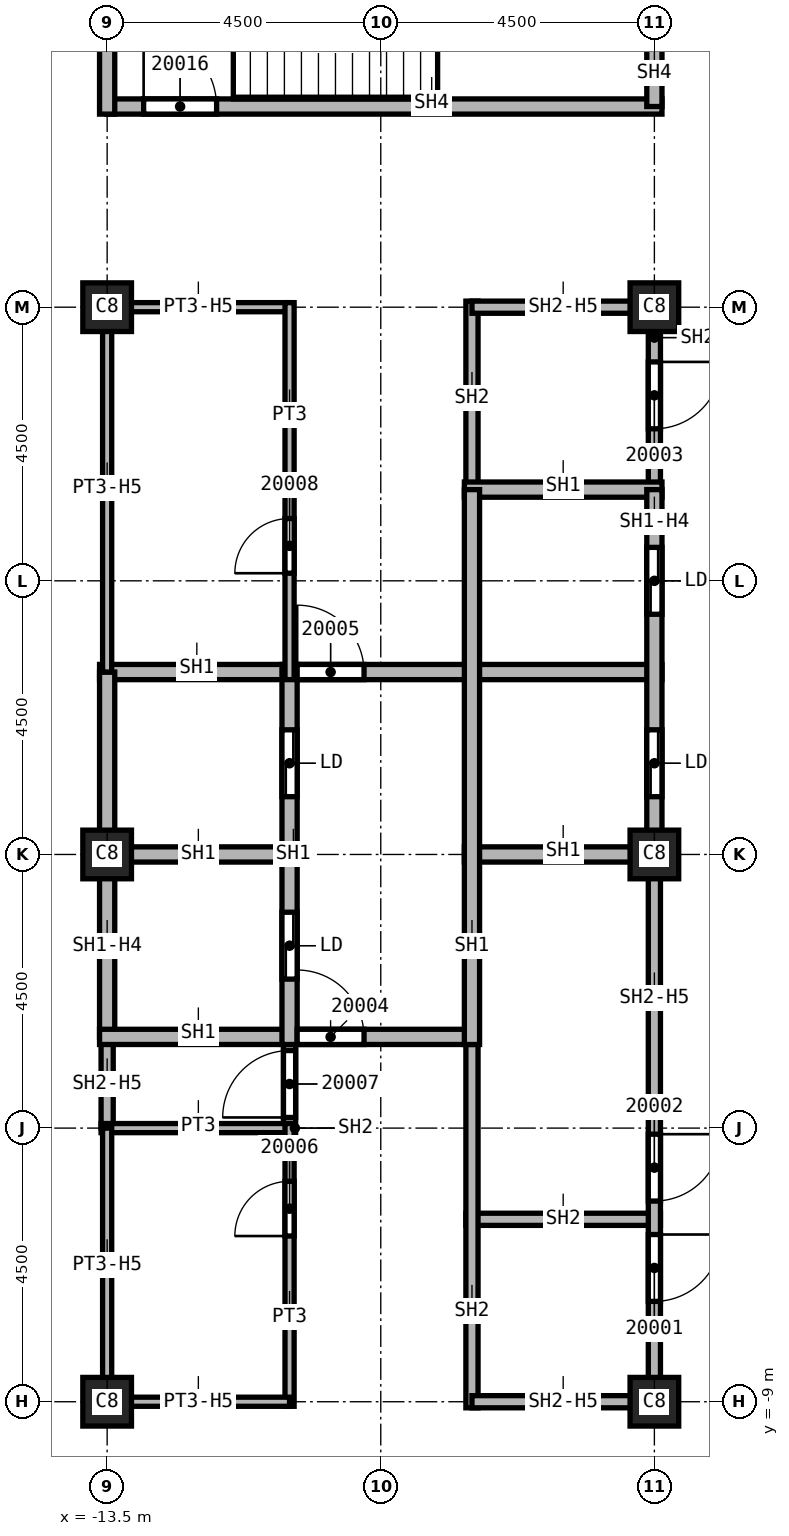
"""IFC4 building model, lengths in metres.
Left out: names, types, materials, properties, quantities, classifications, styles, units other than length and angle.
Written with IfcOpenShell. Run it as: python <this file> out.ifc"""

import sys

from ifc_helpers import new_model, si_unit, direction, frame, frame_2d, origin, origin_2d, place, context, subcontext, project, spatial, rectangle, extrude, element, fill, save


model = new_model("IFC4")
c1 = context("Model", 3, precision=1e-05, world=origin(), true_north=direction((0.0, 1.0)))
c2 = subcontext(c1, "Body", "Model", "MODEL_VIEW")
j1 = project(units=[si_unit("LENGTHUNIT", "METRE"), si_unit("PLANEANGLEUNIT", "RADIAN")], contexts=[c1])
p1 = place(None, origin())
s1 = spatial("IfcSite", under=j1, at=p1, CompositionType="ELEMENT")
p2 = place(p1, origin())
s2 = spatial("IfcBuilding", under=s1, at=p2, CompositionType="ELEMENT")
p3 = place(p2, frame((0.0, 0.0, 290.0)))
s3 = spatial("IfcBuildingStorey", under=s2, at=p3, CompositionType="ELEMENT", Elevation=290.0)
for number, where, z_axis, x_axis in (
    (1, (-4.5, 0.0, 0.0), (0.0, 0.0, 1.0), (1.0, 0.0, 0.0)),
    (2, (-4.5, 9.0, 0.0), (0.0, 0.0, 1.0), (1.0, 0.0, 0.0)),
    (3, (-4.5, -9.0, 0.0), (0.0, 0.0, 1.0), (1.0, 0.0, 0.0)),
    (4, (-13.5, 0.0, 0.0), (0.0, 0.0, 1.0), (1.0, 0.0, 0.0)),
    (5, (-13.5, 9.0, 0.0), (0.0, 0.0, 1.0), (1.0, 0.0, 0.0)),
    (6, (-13.5, -9.0, 0.0), (0.0, 0.0, 1.0), (1.0, 0.0, 0.0)),
):
    element("IfcColumn", number, at=place(p3, frame(where, z_axis=z_axis, x_axis=x_axis)), inside=s3, PredefinedType="COLUMN", context=c2, shape_type="SweptSolid", body=[
        extrude(rectangle(XDim=0.8, YDim=0.8, at=origin_2d()), origin(), (0.0, 0.0, 1.0), 3.59),
    ])
p4 = place(p3, frame((-13.5, -4.5, 0.0), z_axis=(0.0, 0.0, 1.0), x_axis=(0.0, 1.0, 0.0)))
e7 = element("IfcWall", 7, at=p4, inside=s3, PredefinedType="SOLIDWALL", context=c2, shape_type="SweptSolid", body=[
    extrude(rectangle(XDim=1.5, YDim=0.2, at=frame_2d((0.75, 0.0))), origin(), (0.0, 0.0, 1.0), 2.828),
])
p5 = place(p3, frame((-10.5, -4.575, 0.0), z_axis=(0.0, 0.0, 1.0), x_axis=(0.0, 1.0, 0.0)))
e8 = element("IfcWall", 8, at=p5, inside=s3, PredefinedType="SOLIDWALL", context=c2, shape_type="SweptSolid", body=[
    extrude(rectangle(XDim=1.7, YDim=0.2, at=frame_2d((0.85, 0.0))), origin(), (0.0, 0.0, 1.0), 3.59),
])
p6 = place(p5, frame((0.25, 0.0, 0.0)))
e9 = element("IfcOpeningElement", 9, at=p6, cuts=e8, PredefinedType="OPENING", context=c2, shape_type="SweptSolid", body=[
    extrude(rectangle(XDim=1.1, YDim=2.1, at=frame_2d((0.55, 1.05))), frame((0.0, 0.1, 0.0), z_axis=(0.0, -1.0, 0.0), x_axis=(1.0, 0.0, 0.0)), (0.0, 0.0, 1.0), 0.2),
])
p7 = place(p3, frame((-7.6, -6.0, 0.0), z_axis=(0.0, 0.0, 1.0), x_axis=(1.0, 0.0, 0.0)))
e10 = element("IfcWall", 10, at=p7, inside=s3, PredefinedType="SOLIDWALL", context=c2, shape_type="SweptSolid", body=[
    extrude(rectangle(XDim=3.2, YDim=0.2, at=frame_2d((1.6, 0.0))), origin(), (0.0, 0.0, 1.0), 3.59),
])
p8 = place(p3, frame((-7.5, -9.1, 0.0), z_axis=(0.0, 0.0, 1.0), x_axis=(0.0, 1.0, 0.0)))
e11 = element("IfcWall", 11, at=p8, inside=s3, PredefinedType="SOLIDWALL", context=c2, shape_type="SweptSolid", body=[
    extrude(rectangle(XDim=6.225, YDim=0.2, at=frame_2d((3.113, 0.0))), origin(), (0.0, 0.0, 1.0), 3.59),
])
p9 = place(p3, frame((-7.5, 6.0, 0.0), z_axis=(0.0, 0.0, 1.0), x_axis=(0.0, 1.0, 0.0)))
e12 = element("IfcWall", 12, at=p9, inside=s3, PredefinedType="SOLIDWALL", context=c2, shape_type="SweptSolid", body=[
    extrude(rectangle(XDim=3.1, YDim=0.2, at=frame_2d((1.55, 0.0))), origin(), (0.0, 0.0, 1.0), 3.59),
])
for number, where, z_axis, x_axis in (
    (13, (-7.5, 9.0, 0.0), (0.0, 0.0, 1.0), (1.0, 0.0, 0.0)),
    (14, (-4.5, -9.0, 0.0), (0.0, 0.0, 1.0), (-1.0, 0.0, 0.0)),
):
    element("IfcWall", number, at=place(p3, frame(where, z_axis=z_axis, x_axis=x_axis)), inside=s3, PredefinedType="SOLIDWALL", context=c2, shape_type="SweptSolid", body=[
        extrude(rectangle(XDim=3.0, YDim=0.2, at=frame_2d((1.5, 0.0))), origin(), (0.0, 0.0, 1.0), 2.828),
    ])
p10 = place(p3, frame((-4.5, 0.0, 0.0), z_axis=(0.0, 0.0, 1.0), x_axis=(0.0, -1.0, 0.0)))
e15 = element("IfcWall", 15, at=p10, inside=s3, PredefinedType="SOLIDWALL", context=c2, shape_type="SweptSolid", body=[
    extrude(rectangle(XDim=9.1, YDim=0.2, at=frame_2d((4.55, 0.0))), origin(), (0.0, 0.0, 1.0), 2.828),
])
p11 = place(p10, frame((6.25, 0.0, 0.0)))
e16 = element("IfcOpeningElement", 16, at=p11, cuts=e15, PredefinedType="OPENING", context=c2, shape_type="SweptSolid", body=[
    extrude(rectangle(XDim=1.1, YDim=2.1, at=frame_2d((0.55, 1.05))), frame((0.0, 0.1, 0.0), z_axis=(0.0, -1.0, 0.0), x_axis=(1.0, 0.0, 0.0)), (0.0, 0.0, 1.0), 0.2),
])
p12 = place(p10, frame((4.6, 0.0, 0.0)))
e17 = element("IfcOpeningElement", 17, at=p12, cuts=e15, PredefinedType="OPENING", context=c2, shape_type="SweptSolid", body=[
    extrude(rectangle(XDim=1.1, YDim=2.1, at=frame_2d((0.55, 1.05))), frame((0.0, 0.1, 0.0), z_axis=(0.0, -1.0, 0.0), x_axis=(1.0, 0.0, 0.0)), (0.0, 0.0, 1.0), 0.2),
])
p13 = place(p3, frame((-4.5, 9.1, 0.0), z_axis=(0.0, 0.0, 1.0), x_axis=(0.0, -1.0, 0.0)))
e18 = element("IfcWall", 18, at=p13, inside=s3, PredefinedType="SOLIDWALL", context=c2, shape_type="SweptSolid", body=[
    extrude(rectangle(XDim=3.1, YDim=0.2, at=frame_2d((1.55, 0.0))), origin(), (0.0, 0.0, 1.0), 2.828),
])
p14 = place(p13, frame((1.0, 0.0, 0.0)))
e19 = element("IfcOpeningElement", 19, at=p14, cuts=e18, PredefinedType="OPENING", context=c2, shape_type="SweptSolid", body=[
    extrude(rectangle(XDim=1.1, YDim=2.1, at=frame_2d((0.55, 1.05))), frame((0.0, 0.1, 0.0), z_axis=(0.0, -1.0, 0.0), x_axis=(1.0, 0.0, 0.0)), (0.0, 0.0, 1.0), 0.2),
])
p15 = place(p3, frame((-13.625, 0.0, 0.0), z_axis=(0.0, 0.0, 1.0), x_axis=(1.0, 0.0, 0.0)))
e20 = element("IfcWall", 20, at=p15, inside=s3, PredefinedType="SOLIDWALL", context=c2, shape_type="SweptSolid", body=[
    extrude(rectangle(XDim=3.125, YDim=0.25, at=frame_2d((1.562, 0.0))), origin(), (0.0, 0.0, 1.0), 3.59),
])
p16 = place(p3, frame((-13.625, 3.0, 0.0), z_axis=(0.0, 0.0, 1.0), x_axis=(1.0, 0.0, 0.0)))
e21 = element("IfcWall", 21, at=p16, inside=s3, PredefinedType="SOLIDWALL", context=c2, shape_type="SweptSolid", body=[
    extrude(rectangle(XDim=9.25, YDim=0.25, at=frame_2d((4.625, 0.0))), origin(), (0.0, 0.0, 1.0), 3.59),
])
p17 = place(p16, frame((3.25, 0.0, 0.0)))
e22 = element("IfcOpeningElement", 22, at=p17, cuts=e21, PredefinedType="OPENING", context=c2, shape_type="SweptSolid", body=[
    extrude(rectangle(XDim=1.1, YDim=2.1, at=frame_2d((0.55, 1.05))), frame((0.0, 0.125, 0.0), z_axis=(0.0, -1.0, 0.0), x_axis=(1.0, 0.0, 0.0)), (0.0, 0.0, 1.0), 0.25),
])
p18 = place(p3, frame((-13.5, -3.0, 0.0), z_axis=(0.0, 0.0, 1.0), x_axis=(0.0, 1.0, 0.0)))
e23 = element("IfcWall", 23, at=p18, inside=s3, PredefinedType="SOLIDWALL", context=c2, shape_type="SweptSolid", body=[
    extrude(rectangle(XDim=6.0, YDim=0.25, at=frame_2d((3.0, 0.0))), origin(), (0.0, 0.0, 1.0), 2.828),
])
p19 = place(p3, frame((-13.625, -3.0, 0.0), z_axis=(0.0, 0.0, 1.0), x_axis=(1.0, 0.0, 0.0)))
e24 = element("IfcWall", 24, at=p19, inside=s3, PredefinedType="SOLIDWALL", context=c2, shape_type="SweptSolid", body=[
    extrude(rectangle(XDim=6.125, YDim=0.25, at=frame_2d((3.062, 0.0))), origin(), (0.0, 0.0, 1.0), 3.59),
])
p20 = place(p19, frame((3.25, 0.0, 0.0)))
e25 = element("IfcOpeningElement", 25, at=p20, cuts=e24, PredefinedType="OPENING", context=c2, shape_type="SweptSolid", body=[
    extrude(rectangle(XDim=1.1, YDim=2.1, at=frame_2d((0.55, 1.05))), frame((0.0, 0.125, 0.0), z_axis=(0.0, -1.0, 0.0), x_axis=(1.0, 0.0, 0.0)), (0.0, 0.0, 1.0), 0.25),
])
p21 = place(p3, frame((-10.5, -3.125, 0.0), z_axis=(0.0, 0.0, 1.0), x_axis=(0.0, 1.0, 0.0)))
e26 = element("IfcWall", 26, at=p21, inside=s3, PredefinedType="SOLIDWALL", context=c2, shape_type="SweptSolid", body=[
    extrude(rectangle(XDim=6.25, YDim=0.25, at=frame_2d((3.125, 0.0))), origin(), (0.0, 0.0, 1.0), 3.59),
])
p22 = place(p21, frame((1.075, 0.0, 0.0)))
e27 = element("IfcOpeningElement", 27, at=p22, cuts=e26, PredefinedType="OPENING", context=c2, shape_type="SweptSolid", body=[
    extrude(rectangle(XDim=1.1, YDim=2.1, at=frame_2d((0.55, 1.05))), frame((0.0, 0.125, 0.0), z_axis=(0.0, -1.0, 0.0), x_axis=(1.0, 0.0, 0.0)), (0.0, 0.0, 1.0), 0.25),
])
p23 = place(p21, frame((4.075, 0.0, 0.0)))
e28 = element("IfcOpeningElement", 28, at=p23, cuts=e26, PredefinedType="OPENING", context=c2, shape_type="SweptSolid", body=[
    extrude(rectangle(XDim=1.1, YDim=2.1, at=frame_2d((0.55, 1.05))), frame((0.0, 0.125, 0.0), z_axis=(0.0, -1.0, 0.0), x_axis=(1.0, 0.0, 0.0)), (0.0, 0.0, 1.0), 0.25),
])
for number, where, z_axis, x_axis in (
    (29, (-7.625, 0.0, 0.0), (0.0, 0.0, 1.0), (1.0, 0.0, 0.0)),
    (30, (-7.625, 6.0, 0.0), (0.0, 0.0, 1.0), (1.0, 0.0, 0.0)),
):
    element("IfcWall", number, at=place(p3, frame(where, z_axis=z_axis, x_axis=x_axis)), inside=s3, PredefinedType="SOLIDWALL", context=c2, shape_type="SweptSolid", body=[
        extrude(rectangle(XDim=3.25, YDim=0.25, at=frame_2d((1.625, 0.0))), origin(), (0.0, 0.0, 1.0), 3.59),
    ])
p24 = place(p3, frame((-7.5, -3.125, 0.0), z_axis=(0.0, 0.0, 1.0), x_axis=(0.0, 1.0, 0.0)))
e31 = element("IfcWall", 31, at=p24, inside=s3, PredefinedType="SOLIDWALL", context=c2, shape_type="SweptSolid", body=[
    extrude(rectangle(XDim=9.125, YDim=0.25, at=frame_2d((4.562, 0.0))), origin(), (0.0, 0.0, 1.0), 3.59),
])
p25 = place(p3, frame((-4.5, 6.0, 0.0), z_axis=(0.0, 0.0, 1.0), x_axis=(0.0, -1.0, 0.0)))
e32 = element("IfcWall", 32, at=p25, inside=s3, PredefinedType="SOLIDWALL", context=c2, shape_type="SweptSolid", body=[
    extrude(rectangle(XDim=6.0, YDim=0.25, at=frame_2d((3.0, 0.0))), origin(), (0.0, 0.0, 1.0), 2.828),
])
p26 = place(p25, frame((3.95, 0.0, 0.0)))
e33 = element("IfcOpeningElement", 33, at=p26, cuts=e32, PredefinedType="OPENING", context=c2, shape_type="SweptSolid", body=[
    extrude(rectangle(XDim=1.1, YDim=2.1, at=frame_2d((0.55, 1.05))), frame((0.0, 0.125, 0.0), z_axis=(0.0, -1.0, 0.0), x_axis=(1.0, 0.0, 0.0)), (0.0, 0.0, 1.0), 0.25),
])
p27 = place(p25, frame((0.95, 0.0, 0.0)))
e34 = element("IfcOpeningElement", 34, at=p27, cuts=e32, PredefinedType="OPENING", context=c2, shape_type="SweptSolid", body=[
    extrude(rectangle(XDim=1.1, YDim=2.1, at=frame_2d((0.55, 1.05))), frame((0.0, 0.125, 0.0), z_axis=(0.0, -1.0, 0.0), x_axis=(1.0, 0.0, 0.0)), (0.0, 0.0, 1.0), 0.25),
])
p28 = place(p3, frame((-13.5, 12.3, 0.0), z_axis=(0.0, 0.0, 1.0), x_axis=(1.0, 0.0, 0.0)))
e35 = element("IfcWall", 35, at=p28, inside=s3, PredefinedType="SOLIDWALL", context=c2, shape_type="SweptSolid", body=[
    extrude(rectangle(XDim=9.125, YDim=0.25, at=frame_2d((4.562, 0.0))), origin(), (0.0, 0.0, 1.0), 3.59),
])
p29 = place(p28, frame((0.6, 0.0, 0.0)))
e36 = element("IfcOpeningElement", 36, at=p29, cuts=e35, PredefinedType="OPENING", context=c2, shape_type="SweptSolid", body=[
    extrude(rectangle(XDim=1.2, YDim=2.1, at=frame_2d((0.6, 1.05))), frame((0.0, 0.125, 0.0), z_axis=(0.0, -1.0, 0.0), x_axis=(1.0, 0.0, 0.0)), (0.0, 0.0, 1.0), 0.25),
])
p30 = place(p3, frame((-13.5, 16.78, 0.0), z_axis=(0.0, 0.0, 1.0), x_axis=(0.0, -1.0, 0.0)))
e37 = element("IfcWall", 37, at=p30, inside=s3, PredefinedType="SOLIDWALL", context=c2, shape_type="SweptSolid", body=[
    extrude(rectangle(XDim=4.605, YDim=0.25, at=frame_2d((2.302, 0.0))), origin(), (0.0, 0.0, 1.0), 3.59),
])
p31 = place(p3, frame((-4.5, 13.283, 0.0), z_axis=(0.0, 0.0, 1.0), x_axis=(0.0, -1.0, 0.0)))
e38 = element("IfcWall", 38, at=p31, inside=s3, PredefinedType="SOLIDWALL", context=c2, shape_type="SweptSolid", body=[
    extrude(rectangle(XDim=0.983, YDim=0.25, at=frame_2d((0.491, 0.0))), origin(), (0.0, 0.0, 1.0), 3.59),
])
p32 = place(p3, frame((-13.6, -4.5, 0.0), z_axis=(0.0, 0.0, 1.0), x_axis=(1.0, 0.0, 0.0)))
e39 = element("IfcWall", 39, at=p32, inside=s3, PredefinedType="PARTITIONING", context=c2, shape_type="SweptSolid", body=[
    extrude(rectangle(XDim=3.1, YDim=0.15, at=frame_2d((1.55, 0.0))), origin(), (0.0, 0.0, 1.0), 3.59),
])
p33 = place(p3, frame((-13.5, -9.075, 0.0), z_axis=(0.0, 0.0, 1.0), x_axis=(0.0, 1.0, 0.0)))
e40 = element("IfcWall", 40, at=p33, inside=s3, PredefinedType="PARTITIONING", context=c2, shape_type="SweptSolid", body=[
    extrude(rectangle(XDim=4.575, YDim=0.15, at=frame_2d((2.288, 0.0))), origin(), (0.0, 0.0, 1.0), 2.828),
])
p34 = place(p3, frame((-13.5, 3.0, 0.0), z_axis=(0.0, 0.0, 1.0), x_axis=(0.0, 1.0, 0.0)))
e41 = element("IfcWall", 41, at=p34, inside=s3, PredefinedType="PARTITIONING", context=c2, shape_type="SweptSolid", body=[
    extrude(rectangle(XDim=6.075, YDim=0.15, at=frame_2d((3.038, 0.0))), origin(), (0.0, 0.0, 1.0), 2.828),
])
p35 = place(p3, frame((-13.5, 9.0, 0.0), z_axis=(0.0, 0.0, 1.0), x_axis=(1.0, 0.0, 0.0)))
e42 = element("IfcWall", 42, at=p35, inside=s3, PredefinedType="PARTITIONING", context=c2, shape_type="SweptSolid", body=[
    extrude(rectangle(XDim=3.0, YDim=0.15, at=frame_2d((1.5, 0.0))), origin(), (0.0, 0.0, 1.0), 2.828),
])
p36 = place(p3, frame((-10.5, -9.075, 0.0), z_axis=(0.0, 0.0, 1.0), x_axis=(0.0, 1.0, 0.0)))
e43 = element("IfcWall", 43, at=p36, inside=s3, PredefinedType="PARTITIONING", context=c2, shape_type="SweptSolid", body=[
    extrude(rectangle(XDim=4.65, YDim=0.15, at=frame_2d((2.325, 0.0))), origin(), (0.0, 0.0, 1.0), 3.59),
])
p37 = place(p36, frame((2.8, 0.0, 0.0)))
e44 = element("IfcOpeningElement", 44, at=p37, cuts=e43, PredefinedType="OPENING", context=c2, shape_type="SweptSolid", body=[
    extrude(rectangle(XDim=0.9, YDim=2.1, at=frame_2d((0.45, 1.05))), frame((0.0, 0.075, 0.0), z_axis=(0.0, -1.0, 0.0), x_axis=(1.0, 0.0, 0.0)), (0.0, 0.0, 1.0), 0.15),
])
p38 = place(p3, frame((-10.5, -9.0, 0.0), z_axis=(0.0, 0.0, 1.0), x_axis=(-1.0, 0.0, 0.0)))
e45 = element("IfcWall", 45, at=p38, inside=s3, PredefinedType="PARTITIONING", context=c2, shape_type="SweptSolid", body=[
    extrude(rectangle(XDim=3.0, YDim=0.15, at=frame_2d((1.5, 0.0))), origin(), (0.0, 0.0, 1.0), 2.828),
])
p39 = place(p3, frame((-10.5, 2.875, 0.0), z_axis=(0.0, 0.0, 1.0), x_axis=(0.0, 1.0, 0.0)))
e46 = element("IfcWall", 46, at=p39, inside=s3, PredefinedType="PARTITIONING", context=c2, shape_type="SweptSolid", body=[
    extrude(rectangle(XDim=6.2, YDim=0.15, at=frame_2d((3.1, 0.0))), origin(), (0.0, 0.0, 1.0), 3.59),
])
p40 = place(p39, frame((1.75, 0.0, 0.0)))
e47 = element("IfcOpeningElement", 47, at=p40, cuts=e46, PredefinedType="OPENING", context=c2, shape_type="SweptSolid", body=[
    extrude(rectangle(XDim=0.9, YDim=2.1, at=frame_2d((0.45, 1.05))), frame((0.0, 0.075, 0.0), z_axis=(0.0, -1.0, 0.0), x_axis=(1.0, 0.0, 0.0)), (0.0, 0.0, 1.0), 0.15),
])
p41 = place(p11, origin())
e48 = element("IfcDoor", 48, at=p41, inside=s3, OperationType="SINGLE_SWING_RIGHT", PredefinedType="DOOR", context=c2, shape_type="SweptSolid", body=[
    extrude(rectangle(XDim=1.1, YDim=2.1, at=frame_2d((0.55, 1.05))), frame((0.0, 0.025, 0.0), z_axis=(0.0, -1.0, 0.0), x_axis=(1.0, 0.0, 0.0)), (0.0, 0.0, 1.0), 0.05),
])
fill(e16, e48)
p42 = place(p12, origin())
e49 = element("IfcDoor", 49, at=p42, inside=s3, OperationType="SINGLE_SWING_LEFT", PredefinedType="DOOR", context=c2, shape_type="SweptSolid", body=[
    extrude(rectangle(XDim=1.1, YDim=2.1, at=frame_2d((0.55, 1.05))), frame((0.0, 0.025, 0.0), z_axis=(0.0, -1.0, 0.0), x_axis=(1.0, 0.0, 0.0)), (0.0, 0.0, 1.0), 0.05),
])
fill(e17, e49)
p43 = place(p14, origin())
e50 = element("IfcDoor", 50, at=p43, inside=s3, OperationType="SINGLE_SWING_RIGHT", PredefinedType="DOOR", context=c2, shape_type="SweptSolid", body=[
    extrude(rectangle(XDim=1.1, YDim=2.1, at=frame_2d((0.55, 1.05))), frame((0.0, 0.025, 0.0), z_axis=(0.0, -1.0, 0.0), x_axis=(1.0, 0.0, 0.0)), (0.0, 0.0, 1.0), 0.05),
])
fill(e19, e50)
p44 = place(p20, origin())
e51 = element("IfcDoor", 51, at=p44, inside=s3, OperationType="SINGLE_SWING_LEFT", PredefinedType="DOOR", context=c2, shape_type="SweptSolid", body=[
    extrude(rectangle(XDim=1.1, YDim=2.1, at=frame_2d((0.55, 1.05))), frame((0.0, 0.025, 0.0), z_axis=(0.0, -1.0, 0.0), x_axis=(1.0, 0.0, 0.0)), (0.0, 0.0, 1.0), 0.05),
])
fill(e25, e51)
p45 = place(p17, origin())
e52 = element("IfcDoor", 52, at=p45, inside=s3, OperationType="SINGLE_SWING_RIGHT", PredefinedType="DOOR", context=c2, shape_type="SweptSolid", body=[
    extrude(rectangle(XDim=1.1, YDim=2.1, at=frame_2d((0.55, 1.05))), frame((0.0, 0.025, 0.0), z_axis=(0.0, -1.0, 0.0), x_axis=(1.0, 0.0, 0.0)), (0.0, 0.0, 1.0), 0.05),
])
fill(e22, e52)
p46 = place(p37, origin())
e53 = element("IfcDoor", 53, at=p46, inside=s3, OperationType="SINGLE_SWING_LEFT", PredefinedType="DOOR", context=c2, shape_type="SweptSolid", body=[
    extrude(rectangle(XDim=0.9, YDim=2.1, at=frame_2d((0.45, 1.05))), frame((0.0, 0.025, 0.0), z_axis=(0.0, -1.0, 0.0), x_axis=(1.0, 0.0, 0.0)), (0.0, 0.0, 1.0), 0.05),
])
fill(e44, e53)
p47 = place(p6, origin())
e54 = element("IfcDoor", 54, at=p47, inside=s3, OperationType="SINGLE_SWING_RIGHT", PredefinedType="DOOR", context=c2, shape_type="SweptSolid", body=[
    extrude(rectangle(XDim=1.1, YDim=2.1, at=frame_2d((0.55, 1.05))), frame((0.0, 0.025, 0.0), z_axis=(0.0, -1.0, 0.0), x_axis=(1.0, 0.0, 0.0)), (0.0, 0.0, 1.0), 0.05),
])
fill(e9, e54)
p48 = place(p40, origin())
e55 = element("IfcDoor", 55, at=p48, inside=s3, OperationType="SINGLE_SWING_LEFT", PredefinedType="DOOR", context=c2, shape_type="SweptSolid", body=[
    extrude(rectangle(XDim=0.9, YDim=2.1, at=frame_2d((0.45, 1.05))), frame((0.0, 0.025, 0.0), z_axis=(0.0, -1.0, 0.0), x_axis=(1.0, 0.0, 0.0)), (0.0, 0.0, 1.0), 0.05),
])
fill(e47, e55)
p49 = place(p29, origin())
e56 = element("IfcDoor", 56, at=p49, inside=s3, OperationType="SINGLE_SWING_LEFT", PredefinedType="DOOR", context=c2, shape_type="SweptSolid", body=[
    extrude(rectangle(XDim=1.2, YDim=2.1, at=frame_2d((0.6, 1.05))), frame((0.0, 0.025, 0.0), z_axis=(0.0, -1.0, 0.0), x_axis=(1.0, 0.0, 0.0)), (0.0, 0.0, 1.0), 0.05),
])
fill(e36, e56)
p50 = place(p26, origin())
e57 = element("IfcDoor", 57, at=p50, inside=s3, OperationType="SLIDING_TO_LEFT", PredefinedType="DOOR", context=c2, shape_type="SweptSolid", body=[
    extrude(rectangle(XDim=1.1, YDim=2.1, at=frame_2d((0.55, 1.05))), frame((0.0, 0.025, 0.0), z_axis=(0.0, -1.0, 0.0), x_axis=(1.0, 0.0, 0.0)), (0.0, 0.0, 1.0), 0.05),
])
fill(e33, e57)
p51 = place(p27, origin())
e58 = element("IfcDoor", 58, at=p51, inside=s3, OperationType="SLIDING_TO_LEFT", PredefinedType="DOOR", context=c2, shape_type="SweptSolid", body=[
    extrude(rectangle(XDim=1.1, YDim=2.1, at=frame_2d((0.55, 1.05))), frame((0.0, 0.025, 0.0), z_axis=(0.0, -1.0, 0.0), x_axis=(1.0, 0.0, 0.0)), (0.0, 0.0, 1.0), 0.05),
])
fill(e34, e58)
p52 = place(p22, origin())
e59 = element("IfcDoor", 59, at=p52, inside=s3, OperationType="SLIDING_TO_LEFT", PredefinedType="DOOR", context=c2, shape_type="SweptSolid", body=[
    extrude(rectangle(XDim=1.1, YDim=2.1, at=frame_2d((0.55, 1.05))), frame((0.0, 0.025, 0.0), z_axis=(0.0, -1.0, 0.0), x_axis=(1.0, 0.0, 0.0)), (0.0, 0.0, 1.0), 0.05),
])
fill(e27, e59)
p53 = place(p23, origin())
e60 = element("IfcDoor", 60, at=p53, inside=s3, OperationType="SLIDING_TO_LEFT", PredefinedType="DOOR", context=c2, shape_type="SweptSolid", body=[
    extrude(rectangle(XDim=1.1, YDim=2.1, at=frame_2d((0.55, 1.05))), frame((0.0, 0.025, 0.0), z_axis=(0.0, -1.0, 0.0), x_axis=(1.0, 0.0, 0.0)), (0.0, 0.0, 1.0), 0.05),
])
fill(e28, e60)
save(model, sys.argv[1])
